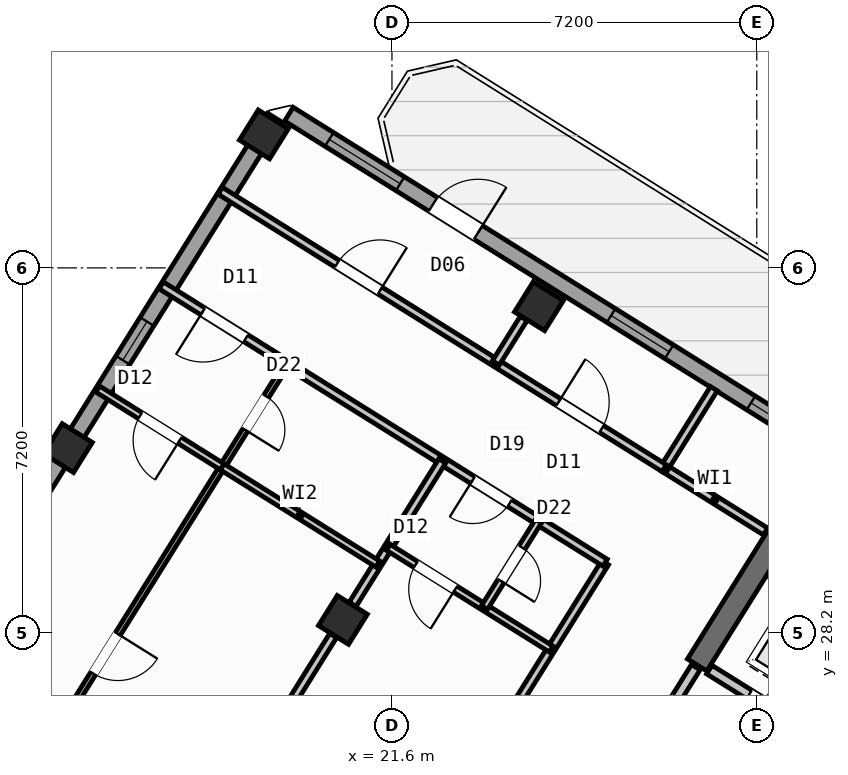
"""IFC4 building model, lengths in metres.
Left out: names, types, materials, properties, quantities, classifications, styles, units other than length and angle.
Written with IfcOpenShell. Run it as: python <this file> out.ifc"""

import sys

from ifc_helpers import new_model, si_unit, direction, frame, frame_2d, origin, origin_2d, place, context, subcontext, project, spatial, rectangle, hollow_rectangle, extrude, source, transform, mapped, element, fill, save


model = new_model("IFC4")
c1 = context("Model", 3, precision=1e-05, world=origin(), true_north=direction((0.0, 1.0)))
c2 = subcontext(c1, "Body", "Model", "MODEL_VIEW")
j1 = project(units=[si_unit("LENGTHUNIT", "METRE"), si_unit("PLANEANGLEUNIT", "RADIAN")], contexts=[c1])
p1 = place(None, origin())
s1 = spatial("IfcSite", under=j1, at=p1, CompositionType="ELEMENT")
p2 = place(p1, origin())
s2 = spatial("IfcBuilding", under=s1, at=p2, CompositionType="ELEMENT")
p3 = place(p2, frame((0.0, 0.0, 284.4)))
s3 = spatial("IfcBuildingStorey", under=s2, at=p3, CompositionType="ELEMENT", Elevation=284.4)
p4 = place(p3, frame((29.544, 30.636, 0.0), z_axis=(0.0, 0.0, 1.0), x_axis=(-0.529902075036, -0.848058836916, 0.0)))
e1 = element("IfcWall", 1, at=p4, inside=s3, PredefinedType="SHEAR", context=c2, shape_type="SweptSolid", body=[
    extrude(rectangle(XDim=3.625, YDim=0.45, at=frame_2d((1.812, 0.0))), origin(), (0.0, 0.0, 1.0), 3.35),
])
m1 = source(origin(), c2, "Body", "SweptSolid", [
    extrude(hollow_rectangle(XDim=0.7, YDim=0.7, WallThickness=0.028, at=origin_2d()), origin(), (0.0, 0.0, 1.0), 3.6),
])
for number, where, z_axis, x_axis in (
    (2, (24.5, 34.643, 0.0), (0.0, 0.0, 1.0), (-0.848, 0.53, 0.0)),
    (3, (20.632, 28.452, 0.0), (0.0, 0.0, 1.0), (-0.848, 0.53, 0.0)),
    (4, (19.073, 38.034, 0.0), (0.0, 0.0, 1.0), (-0.848, 0.53, 0.0)),
    (5, (15.205, 31.844, 0.0), (0.0, 0.0, 1.0), (-0.848, 0.53, 0.0)),
):
    element("IfcColumn", number, at=place(p3, frame(where, z_axis=z_axis, x_axis=x_axis)), inside=s3, PredefinedType="COLUMN", context=c2, shape_type="MappedRepresentation", body=[
        mapped(m1, transform((0.0, 0.0, 0.0), scale=1.0)),
    ])
p5 = place(p3, frame((7.842, 20.061, 0.0), z_axis=(0.0, 0.0, 1.0), x_axis=(0.529915577903, 0.84805039962, 0.0)))
e6 = element("IfcWall", 6, at=p5, inside=s3, PredefinedType="STANDARD", context=c2, shape_type="SweptSolid", body=[
    extrude(rectangle(XDim=21.587, YDim=0.32, at=frame_2d((10.794, 0.0))), origin(), (0.0, 0.0, 1.0), 2.875),
])
p6 = place(p5, frame((2.606, 0.0, 0.9)))
e7 = element("IfcOpeningElement", 7, at=p6, cuts=e6, PredefinedType="OPENING", context=c2, shape_type="SweptSolid", body=[
    extrude(rectangle(XDim=1.65, YDim=1.45, at=frame_2d((0.825, 0.725))), frame((0.0, 0.17, 0.0), z_axis=(0.0, -1.0, 0.0), x_axis=(1.0, 0.0, 0.0)), (0.0, 0.0, 1.0), 0.34),
])
p7 = place(p5, frame((8.094, 0.0, 0.9)))
e8 = element("IfcOpeningElement", 8, at=p7, cuts=e6, PredefinedType="OPENING", context=c2, shape_type="SweptSolid", body=[
    extrude(rectangle(XDim=1.35, YDim=1.45, at=frame_2d((0.675, 0.725))), frame((0.0, 0.17, 0.0), z_axis=(0.0, -1.0, 0.0), x_axis=(1.0, 0.0, 0.0)), (0.0, 0.0, 1.0), 0.34),
])
p8 = place(p5, frame((11.044, 0.0, 0.9)))
e9 = element("IfcOpeningElement", 9, at=p8, cuts=e6, PredefinedType="OPENING", context=c2, shape_type="SweptSolid", body=[
    extrude(rectangle(XDim=1.35, YDim=1.45, at=frame_2d((0.675, 0.725))), frame((0.0, 0.17, 0.0), z_axis=(0.0, -1.0, 0.0), x_axis=(1.0, 0.0, 0.0)), (0.0, 0.0, 1.0), 0.34),
])
p9 = place(p5, frame((15.939, 0.0, 1.0)))
e10 = element("IfcOpeningElement", 10, at=p9, cuts=e6, PredefinedType="OPENING", context=c2, shape_type="SweptSolid", body=[
    extrude(rectangle(XDim=0.9, YDim=1.25, at=frame_2d((0.45, 0.625))), frame((0.0, 0.17, 0.0), z_axis=(0.0, -1.0, 0.0), x_axis=(1.0, 0.0, 0.0)), (0.0, 0.0, 1.0), 0.34),
])
p10 = place(p3, frame((19.566, 38.434, 0.0), z_axis=(0.0, 0.0, 1.0), x_axis=(0.84804567626, -0.529923136858, 0.0)))
e11 = element("IfcWall", 11, at=p10, inside=s3, PredefinedType="STANDARD", context=c2, shape_type="SweptSolid", body=[
    extrude(rectangle(XDim=25.188, YDim=0.32, at=frame_2d((12.594, 0.0))), origin(), (0.0, 0.0, 1.0), 3.35),
])
p11 = place(p10, frame((3.355, 0.0, 0.0)))
e12 = element("IfcOpeningElement", 12, at=p11, cuts=e11, PredefinedType="OPENING", context=c2, shape_type="SweptSolid", body=[
    extrude(rectangle(XDim=1.05, YDim=2.15, at=frame_2d((0.525, 1.075))), frame((0.0, 0.17, 0.0), z_axis=(0.0, -1.0, 0.0), x_axis=(1.0, 0.0, 0.0)), (0.0, 0.0, 1.0), 0.34),
])
p12 = place(p10, frame((0.939, 0.0, 0.9)))
e13 = element("IfcOpeningElement", 13, at=p12, cuts=e11, PredefinedType="OPENING", context=c2, shape_type="SweptSolid", body=[
    extrude(rectangle(XDim=1.65, YDim=1.45, at=frame_2d((0.825, 0.725))), frame((0.0, 0.17, 0.0), z_axis=(0.0, -1.0, 0.0), x_axis=(1.0, 0.0, 0.0)), (0.0, 0.0, 1.0), 0.34),
])
p13 = place(p10, frame((7.499, 0.0, 0.9)))
e14 = element("IfcOpeningElement", 14, at=p13, cuts=e11, PredefinedType="OPENING", context=c2, shape_type="SweptSolid", body=[
    extrude(rectangle(XDim=1.35, YDim=1.45, at=frame_2d((0.675, 0.725))), frame((0.0, 0.17, 0.0), z_axis=(0.0, -1.0, 0.0), x_axis=(1.0, 0.0, 0.0)), (0.0, 0.0, 1.0), 0.34),
])
p14 = place(p10, frame((10.754, 0.0, 1.0)))
e15 = element("IfcOpeningElement", 15, at=p14, cuts=e11, PredefinedType="OPENING", context=c2, shape_type="SweptSolid", body=[
    extrude(rectangle(XDim=0.9, YDim=1.25, at=frame_2d((0.45, 0.625))), frame((0.0, 0.17, 0.0), z_axis=(0.0, -1.0, 0.0), x_axis=(1.0, 0.0, 0.0)), (0.0, 0.0, 1.0), 0.34),
])
p15 = place(p10, frame((15.694, 0.0, 1.0)))
e16 = element("IfcOpeningElement", 16, at=p15, cuts=e11, PredefinedType="OPENING", context=c2, shape_type="SweptSolid", body=[
    extrude(rectangle(XDim=0.9, YDim=1.25, at=frame_2d((0.45, 0.625))), frame((0.0, 0.17, 0.0), z_axis=(0.0, -1.0, 0.0), x_axis=(1.0, 0.0, 0.0)), (0.0, 0.0, 1.0), 0.34),
])
p16 = place(p10, frame((21.394, 0.0, 1.0)))
e17 = element("IfcOpeningElement", 17, at=p16, cuts=e11, PredefinedType="OPENING", context=c2, shape_type="SweptSolid", body=[
    extrude(rectangle(XDim=0.9, YDim=1.25, at=frame_2d((0.45, 0.625))), frame((0.0, 0.17, 0.0), z_axis=(0.0, -1.0, 0.0), x_axis=(1.0, 0.0, 0.0)), (0.0, 0.0, 1.0), 0.34),
])
p17 = place(p3, frame((31.822, 24.998, 0.0), z_axis=(0.0, 0.0, 1.0), x_axis=(-0.848054125777, 0.529909614701, 0.0)))
e18 = element("IfcWall", 18, at=p17, inside=s3, PredefinedType="STANDARD", context=c2, shape_type="SweptSolid", body=[
    extrude(rectangle(XDim=4.668, YDim=0.2, at=frame_2d((2.334, 0.0))), origin(), (0.0, 0.0, 1.0), 3.34),
])
p18 = place(p17, frame((0.52, 0.0, 0.0)))
e19 = element("IfcOpeningElement", 19, at=p18, cuts=e18, PredefinedType="OPENING", context=c2, shape_type="SweptSolid", body=[
    extrude(rectangle(XDim=1.2, YDim=2.15, at=frame_2d((0.6, 1.075))), frame((0.0, 0.11, 0.0), z_axis=(0.0, -1.0, 0.0), x_axis=(1.0, 0.0, 0.0)), (0.0, 0.0, 1.0), 0.22),
])
p19 = place(p17, frame((2.54, 0.0, 0.0)))
e20 = element("IfcOpeningElement", 20, at=p19, cuts=e18, PredefinedType="OPENING", context=c2, shape_type="SweptSolid", body=[
    extrude(rectangle(XDim=1.2, YDim=2.15, at=frame_2d((0.6, 1.075))), frame((0.0, 0.11, 0.0), z_axis=(0.0, -1.0, 0.0), x_axis=(1.0, 0.0, 0.0)), (0.0, 0.0, 1.0), 0.22),
])
p20 = place(p3, frame((27.596, 27.52, 0.0), z_axis=(0.0, 0.0, 1.0), x_axis=(-0.529865479138, -0.848081702443, 0.0)))
e21 = element("IfcWall", 21, at=p20, inside=s3, PredefinedType="STANDARD", context=c2, shape_type="SweptSolid", body=[
    extrude(rectangle(XDim=2.96, YDim=0.2, at=frame_2d((1.48, 0.0))), origin(), (0.0, 0.0, 1.0), 3.34),
])
p21 = place(p20, frame((0.7, 0.0, 0.0)))
e22 = element("IfcOpeningElement", 22, at=p21, cuts=e21, PredefinedType="OPENING", context=c2, shape_type="SweptSolid", body=[
    extrude(rectangle(XDim=1.5, YDim=2.15, at=frame_2d((0.75, 1.075))), frame((0.0, 0.11, 0.0), z_axis=(0.0, -1.0, 0.0), x_axis=(1.0, 0.0, 0.0)), (0.0, 0.0, 1.0), 0.22),
])
p22 = place(p3, frame((28.972, 30.198, 0.0), z_axis=(0.0, 0.0, 1.0), x_axis=(-0.848015752453, 0.529971021464, 0.0)))
e23 = element("IfcWall", 23, at=p22, inside=s3, PredefinedType="PARTITIONING", context=c2, shape_type="SweptSolid", body=[
    extrude(rectangle(XDim=2.358, YDim=0.16, at=frame_2d((1.179, 0.0))), origin(), (0.0, 0.0, 1.0), 3.34),
])
p23 = place(p3, frame((27.953, 33.016, 0.0), z_axis=(0.0, 0.0, 1.0), x_axis=(-0.529880305451, -0.848072439061, 0.0)))
e24 = element("IfcWall", 24, at=p23, inside=s3, PredefinedType="PARTITIONING", context=c2, shape_type="SweptSolid", body=[
    extrude(rectangle(XDim=1.85, YDim=0.16, at=frame_2d((0.925, 0.0))), origin(), (0.0, 0.0, 1.0), 3.34),
])
p24 = place(p3, frame((25.807, 29.582, 0.0), z_axis=(0.0, 0.0, 1.0), x_axis=(-0.529918119251, -0.84804881162, 0.0)))
e25 = element("IfcWall", 25, at=p24, inside=s3, PredefinedType="PARTITIONING", context=c2, shape_type="SweptSolid", body=[
    extrude(rectangle(XDim=17.65, YDim=0.16, at=frame_2d((8.825, 0.0))), origin(), (0.0, 0.0, 1.0), 3.34),
])
p25 = place(p3, frame((26.973, 31.447, 0.0), z_axis=(0.0, 0.0, 1.0), x_axis=(-0.84805406617, 0.529909710094, 0.0)))
e26 = element("IfcWall", 26, at=p25, inside=s3, PredefinedType="PARTITIONING", context=c2, shape_type="SweptSolid", body=[
    extrude(rectangle(XDim=10.33, YDim=0.16, at=frame_2d((5.165, 0.0))), origin(), (0.0, 0.0, 1.0), 3.34),
])
p26 = place(p25, frame((1.459, 0.0, 0.0)))
e27 = element("IfcOpeningElement", 27, at=p26, cuts=e26, PredefinedType="OPENING", context=c2, shape_type="SweptSolid", body=[
    extrude(rectangle(XDim=1.0, YDim=2.1, at=frame_2d((0.5, 1.05))), frame((0.0, 0.09, 0.0), z_axis=(0.0, -1.0, 0.0), x_axis=(1.0, 0.0, 0.0)), (0.0, 0.0, 1.0), 0.18),
])
p27 = place(p25, frame((6.614, 0.0, 0.0)))
e28 = element("IfcOpeningElement", 28, at=p27, cuts=e26, PredefinedType="OPENING", context=c2, shape_type="SweptSolid", body=[
    extrude(rectangle(XDim=1.0, YDim=2.1, at=frame_2d((0.5, 1.05))), frame((0.0, 0.09, 0.0), z_axis=(0.0, -1.0, 0.0), x_axis=(1.0, 0.0, 0.0)), (0.0, 0.0, 1.0), 0.18),
])
p28 = place(p3, frame((25.807, 29.582, 0.0), z_axis=(0.0, 0.0, 1.0), x_axis=(-0.848060702647, 0.529899089097, 0.0)))
e29 = element("IfcWall", 29, at=p28, inside=s3, PredefinedType="PARTITIONING", context=c2, shape_type="SweptSolid", body=[
    extrude(rectangle(XDim=10.33, YDim=0.16, at=frame_2d((5.165, 0.0))), origin(), (0.0, 0.0, 1.0), 3.34),
])
p29 = place(p28, frame((2.22, 0.0, 0.0)))
e30 = element("IfcOpeningElement", 30, at=p29, cuts=e29, PredefinedType="OPENING", context=c2, shape_type="SweptSolid", body=[
    extrude(rectangle(XDim=0.86, YDim=2.05, at=frame_2d((0.43, 1.025))), frame((0.0, 0.09, 0.0), z_axis=(0.0, -1.0, 0.0), x_axis=(1.0, 0.0, 0.0)), (0.0, 0.0, 1.0), 0.18),
])
p30 = place(p28, frame((8.36, 0.0, 0.0)))
e31 = element("IfcOpeningElement", 31, at=p30, cuts=e29, PredefinedType="OPENING", context=c2, shape_type="SweptSolid", body=[
    extrude(rectangle(XDim=1.0, YDim=2.1, at=frame_2d((0.5, 1.05))), frame((0.0, 0.09, 0.0), z_axis=(0.0, -1.0, 0.0), x_axis=(1.0, 0.0, 0.0)), (0.0, 0.0, 1.0), 0.18),
])
p31 = place(p3, frame((22.593, 31.59, 0.0), z_axis=(0.0, 0.0, 1.0), x_axis=(-0.529900320499, -0.848059933221, 0.0)))
e32 = element("IfcWall", 32, at=p31, inside=s3, PredefinedType="PARTITIONING", context=c2, shape_type="SweptSolid", body=[
    extrude(rectangle(XDim=3.338, YDim=0.16, at=frame_2d((1.669, 0.0))), origin(), (0.0, 0.0, 1.0), 2.875),
])
p32 = place(p3, frame((20.44, 28.145, 0.0), z_axis=(0.0, 0.0, 1.0), x_axis=(-0.529938869374, -0.84803584519, 0.0)))
e33 = element("IfcWall", 33, at=p32, inside=s3, PredefinedType="PARTITIONING", context=c2, shape_type="SweptSolid", body=[
    extrude(rectangle(XDim=6.576, YDim=0.16, at=frame_2d((3.288, 0.0))), origin(), (0.0, 0.0, 1.0), 2.875),
])
p33 = place(p3, frame((24.742, 27.877, 0.0), z_axis=(0.0, 0.0, 1.0), x_axis=(-0.848059820872, 0.529900500304, 0.0)))
e34 = element("IfcWall", 34, at=p33, inside=s3, PredefinedType="PLUMBINGWALL", context=c2, shape_type="SweptSolid", body=[
    extrude(rectangle(XDim=3.79, YDim=0.14, at=frame_2d((1.895, 0.0))), origin(), (0.0, 0.0, 1.0), 3.34),
])
p34 = place(p33, frame((2.23, 0.0, 0.0)))
e35 = element("IfcOpeningElement", 35, at=p34, cuts=e34, PredefinedType="OPENING", context=c2, shape_type="SweptSolid", body=[
    extrude(rectangle(XDim=0.92, YDim=2.08, at=frame_2d((0.46, 1.04))), frame((0.0, 0.08, 0.0), z_axis=(0.0, -1.0, 0.0), x_axis=(1.0, 0.0, 0.0)), (0.0, 0.0, 1.0), 0.16),
])
p35 = place(p3, frame((24.492, 30.403, 0.0), z_axis=(0.0, 0.0, 1.0), x_axis=(-0.529933431478, -0.848039243315, 0.0)))
e36 = element("IfcWall", 36, at=p35, inside=s3, PredefinedType="PLUMBINGWALL", context=c2, shape_type="SweptSolid", body=[
    extrude(rectangle(XDim=2.01, YDim=0.14, at=frame_2d((1.005, 0.0))), origin(), (0.0, 0.0, 1.0), 3.025),
])
p36 = place(p35, frame((0.615, 0.0, 0.0)))
e37 = element("IfcOpeningElement", 37, at=p36, cuts=e36, PredefinedType="OPENING", context=c2, shape_type="SweptSolid", body=[
    extrude(rectangle(XDim=0.78, YDim=2.05, at=frame_2d((0.39, 1.025))), frame((0.0, 0.08, 0.0), z_axis=(0.0, -1.0, 0.0), x_axis=(1.0, 0.0, 0.0)), (0.0, 0.0, 1.0), 0.16),
])
p37 = place(p3, frame((19.523, 33.508, 0.0), z_axis=(0.0, 0.0, 1.0), x_axis=(-0.529910765222, -0.848053406869, 0.0)))
e38 = element("IfcWall", 38, at=p37, inside=s3, PredefinedType="PARTITIONING", context=c2, shape_type="SweptSolid", body=[
    extrude(rectangle(XDim=17.92, YDim=0.11, at=frame_2d((8.96, 0.0))), origin(), (0.0, 0.0, 1.0), 3.34),
])
p38 = place(p37, frame((0.76, 0.0, 0.0)))
e39 = element("IfcOpeningElement", 39, at=p38, cuts=e38, PredefinedType="OPENING", context=c2, shape_type="SweptSolid", body=[
    extrude(rectangle(XDim=0.78, YDim=2.05, at=frame_2d((0.39, 1.025))), frame((0.0, 0.065, 0.0), z_axis=(0.0, -1.0, 0.0), x_axis=(1.0, 0.0, 0.0)), (0.0, 0.0, 1.0), 0.13),
])
p39 = place(p37, frame((6.289, 0.0, 0.0)))
e40 = element("IfcOpeningElement", 40, at=p39, cuts=e38, PredefinedType="OPENING", context=c2, shape_type="SweptSolid", body=[
    extrude(rectangle(XDim=0.92, YDim=2.08, at=frame_2d((0.46, 1.04))), frame((0.0, 0.065, 0.0), z_axis=(0.0, -1.0, 0.0), x_axis=(1.0, 0.0, 0.0)), (0.0, 0.0, 1.0), 0.13),
])
p40 = place(p3, frame((18.251, 31.473, 0.0), z_axis=(0.0, 0.0, 1.0), x_axis=(-0.848059786386, 0.529900555496, 0.0)))
e41 = element("IfcWall", 41, at=p40, inside=s3, PredefinedType="PLUMBINGWALL", context=c2, shape_type="SweptSolid", body=[
    extrude(rectangle(XDim=2.9, YDim=0.14, at=frame_2d((1.45, 0.0))), origin(), (0.0, 0.0, 1.0), 3.34),
])
p41 = place(p40, frame((0.99, 0.0, 0.0)))
e42 = element("IfcOpeningElement", 42, at=p41, cuts=e41, PredefinedType="OPENING", context=c2, shape_type="SweptSolid", body=[
    extrude(rectangle(XDim=0.92, YDim=2.08, at=frame_2d((0.46, 1.04))), frame((0.0, 0.08, 0.0), z_axis=(0.0, -1.0, 0.0), x_axis=(1.0, 0.0, 0.0)), (0.0, 0.0, 1.0), 0.16),
])
p42 = place(p3, frame((21.321, 29.554, 0.0), z_axis=(0.0, 0.0, 1.0), x_axis=(-0.848021036626, 0.529962566074, 0.0)))
e43 = element("IfcWall", 43, at=p42, inside=s3, PredefinedType="PLUMBINGWALL", context=c2, shape_type="SweptSolid", body=[
    extrude(rectangle(XDim=3.62, YDim=0.14, at=frame_2d((1.81, 0.0))), origin(), (0.0, 0.0, 1.0), 3.34),
])
p43 = place(p3, frame((24.2, 34.404, 0.0), z_axis=(0.0, 0.0, 1.0), x_axis=(-0.529977795385, -0.848011519025, 0.0)))
e44 = element("IfcWall", 44, at=p43, inside=s3, PredefinedType="PARTITIONING", context=c2, shape_type="SweptSolid", body=[
    extrude(rectangle(XDim=1.038, YDim=0.16, at=frame_2d((0.519, 0.0))), origin(), (0.0, 0.0, 1.0), 2.875),
])
m2 = source(origin(), c2, "Body", "SweptSolid", [
    extrude(rectangle(XDim=1.05, YDim=2.15, at=frame_2d((0.525, 1.075))), frame((0.0, 0.025, 0.0), z_axis=(0.0, -1.0, 0.0), x_axis=(1.0, 0.0, 0.0)), (0.0, 0.0, 1.0), 0.05),
])
p44 = place(p11, origin())
e45 = element("IfcDoor", 45, at=p44, inside=s3, OperationType="SINGLE_SWING_RIGHT", PredefinedType="DOOR", context=c2, shape_type="MappedRepresentation", body=[
    mapped(m2, transform((0.0, 0.0, 0.0), scale=1.0)),
])
fill(e12, e45)
m3 = source(origin(), c2, "Body", "SweptSolid", [
    extrude(rectangle(XDim=0.9, YDim=1.25, at=frame_2d((0.45, 0.625))), frame((0.0, 0.03, 0.0), z_axis=(0.0, -1.0, 0.0), x_axis=(1.0, 0.0, 0.0)), (0.0, 0.0, 1.0), 0.06),
])
p45 = place(p9, origin())
e46 = element("IfcWindow", 46, at=p45, inside=s3, PartitioningType="SINGLE_PANEL", PredefinedType="WINDOW", context=c2, shape_type="MappedRepresentation", body=[
    mapped(m3, transform((0.0, 0.0, 0.0), scale=1.0)),
])
fill(e10, e46)
m4 = source(origin(), c2, "Body", "SweptSolid", [
    extrude(rectangle(XDim=1.65, YDim=1.45, at=frame_2d((0.825, 0.725))), frame((0.0, 0.03, 0.0), z_axis=(0.0, -1.0, 0.0), x_axis=(1.0, 0.0, 0.0)), (0.0, 0.0, 1.0), 0.06),
])
p46 = place(p12, origin())
e47 = element("IfcWindow", 47, at=p46, inside=s3, PartitioningType="SINGLE_PANEL", PredefinedType="WINDOW", context=c2, shape_type="MappedRepresentation", body=[
    mapped(m4, transform((0.0, 0.0, 0.0), scale=1.0)),
])
fill(e13, e47)
m5 = source(origin(), c2, "Body", "SweptSolid", [
    extrude(rectangle(XDim=1.35, YDim=1.45, at=frame_2d((0.675, 0.725))), frame((0.0, 0.03, 0.0), z_axis=(0.0, -1.0, 0.0), x_axis=(1.0, 0.0, 0.0)), (0.0, 0.0, 1.0), 0.06),
])
p47 = place(p13, origin())
e48 = element("IfcWindow", 48, at=p47, inside=s3, PartitioningType="SINGLE_PANEL", PredefinedType="WINDOW", context=c2, shape_type="MappedRepresentation", body=[
    mapped(m5, transform((0.0, 0.0, 0.0), scale=1.0)),
])
fill(e14, e48)
p48 = place(p14, origin())
e49 = element("IfcWindow", 49, at=p48, inside=s3, PartitioningType="SINGLE_PANEL", PredefinedType="WINDOW", context=c2, shape_type="MappedRepresentation", body=[
    mapped(m3, transform((0.0, 0.0, 0.0), scale=1.0)),
])
fill(e15, e49)
m6 = source(origin(), c2, "Body", "SweptSolid", [
    extrude(rectangle(XDim=1.2, YDim=2.15, at=frame_2d((0.6, 1.075))), frame((0.0, 0.025, 0.0), z_axis=(0.0, -1.0, 0.0), x_axis=(1.0, 0.0, 0.0)), (0.0, 0.0, 1.0), 0.05),
])
p49 = place(p19, origin())
e50 = element("IfcDoor", 50, at=p49, inside=s3, OperationType="DOUBLE_DOOR_SLIDING", PredefinedType="DOOR", context=c2, shape_type="MappedRepresentation", body=[
    mapped(m6, transform((0.0, 0.0, 0.0), scale=1.0)),
])
fill(e20, e50)
m7 = source(origin(), c2, "Body", "SweptSolid", [
    extrude(rectangle(XDim=0.86, YDim=2.05, at=frame_2d((0.43, 1.025))), frame((0.0, 0.025, 0.0), z_axis=(0.0, -1.0, 0.0), x_axis=(1.0, 0.0, 0.0)), (0.0, 0.0, 1.0), 0.05),
])
p50 = place(p29, origin())
e51 = element("IfcDoor", 51, at=p50, inside=s3, OperationType="SINGLE_SWING_RIGHT", PredefinedType="DOOR", context=c2, shape_type="MappedRepresentation", body=[
    mapped(m7, transform((0.0, 0.0, 0.0), scale=1.0)),
])
fill(e30, e51)
m8 = source(origin(), c2, "Body", "SweptSolid", [
    extrude(rectangle(XDim=0.92, YDim=2.08, at=frame_2d((0.46, 1.04))), frame((0.0, 0.025, 0.0), z_axis=(0.0, -1.0, 0.0), x_axis=(1.0, 0.0, 0.0)), (0.0, 0.0, 1.0), 0.05),
])
p51 = place(p34, origin())
e52 = element("IfcDoor", 52, at=p51, inside=s3, OperationType="SINGLE_SWING_LEFT", PredefinedType="DOOR", context=c2, shape_type="MappedRepresentation", body=[
    mapped(m8, transform((0.0, 0.0, 0.0), scale=1.0)),
])
fill(e35, e52)
m9 = source(origin(), c2, "Body", "SweptSolid", [
    extrude(rectangle(XDim=0.78, YDim=2.05, at=frame_2d((0.39, 1.025))), frame((0.0, 0.025, 0.0), z_axis=(0.0, -1.0, 0.0), x_axis=(1.0, 0.0, 0.0)), (0.0, 0.0, 1.0), 0.05),
])
p52 = place(p36, origin())
e53 = element("IfcDoor", 53, at=p52, inside=s3, OperationType="SINGLE_SWING_RIGHT", PredefinedType="DOOR", context=c2, shape_type="MappedRepresentation", body=[
    mapped(m9, transform((0.0, 0.0, 0.0), scale=1.0)),
])
fill(e37, e53)
m10 = source(origin(), c2, "Body", "SweptSolid", [
    extrude(rectangle(XDim=1.0, YDim=2.1, at=frame_2d((0.5, 1.05))), frame((0.0, 0.025, 0.0), z_axis=(0.0, -1.0, 0.0), x_axis=(1.0, 0.0, 0.0)), (0.0, 0.0, 1.0), 0.05),
])
p53 = place(p30, origin())
e54 = element("IfcDoor", 54, at=p53, inside=s3, OperationType="SINGLE_SWING_RIGHT", PredefinedType="DOOR", context=c2, shape_type="MappedRepresentation", body=[
    mapped(m10, transform((0.0, 0.0, 0.0), scale=1.0)),
])
fill(e31, e54)
p54 = place(p41, origin())
e55 = element("IfcDoor", 55, at=p54, inside=s3, OperationType="SINGLE_SWING_LEFT", PredefinedType="DOOR", context=c2, shape_type="MappedRepresentation", body=[
    mapped(m8, transform((0.0, 0.0, 0.0), scale=1.0)),
])
fill(e42, e55)
p55 = place(p38, origin())
e56 = element("IfcDoor", 56, at=p55, inside=s3, OperationType="SINGLE_SWING_RIGHT", PredefinedType="DOOR", context=c2, shape_type="MappedRepresentation", body=[
    mapped(m9, transform((0.0, 0.0, 0.0), scale=1.0)),
])
fill(e39, e56)
p56 = place(p39, origin())
e57 = element("IfcDoor", 57, at=p56, inside=s3, OperationType="SINGLE_SWING_LEFT", PredefinedType="DOOR", context=c2, shape_type="MappedRepresentation", body=[
    mapped(m8, transform((0.0, 0.0, 0.0), scale=1.0)),
])
fill(e40, e57)
p57 = place(p26, frame((1.0, 0.0, 0.0), z_axis=(0.0, 0.0, 1.0), x_axis=(-1.0, 0.0, 0.0)))
e58 = element("IfcDoor", 58, at=p57, inside=s3, OperationType="SINGLE_SWING_LEFT", PredefinedType="DOOR", context=c2, shape_type="MappedRepresentation", body=[
    mapped(m10, transform((0.0, 0.0, 0.0), scale=1.0)),
])
fill(e27, e58)
p58 = place(p27, frame((1.0, 0.0, 0.0), z_axis=(0.0, 0.0, 1.0), x_axis=(-1.0, 0.0, 0.0)))
e59 = element("IfcDoor", 59, at=p58, inside=s3, OperationType="SINGLE_SWING_RIGHT", PredefinedType="DOOR", context=c2, shape_type="MappedRepresentation", body=[
    mapped(m10, transform((0.0, 0.0, 0.0), scale=1.0)),
])
fill(e28, e59)
save(model, sys.argv[1])
